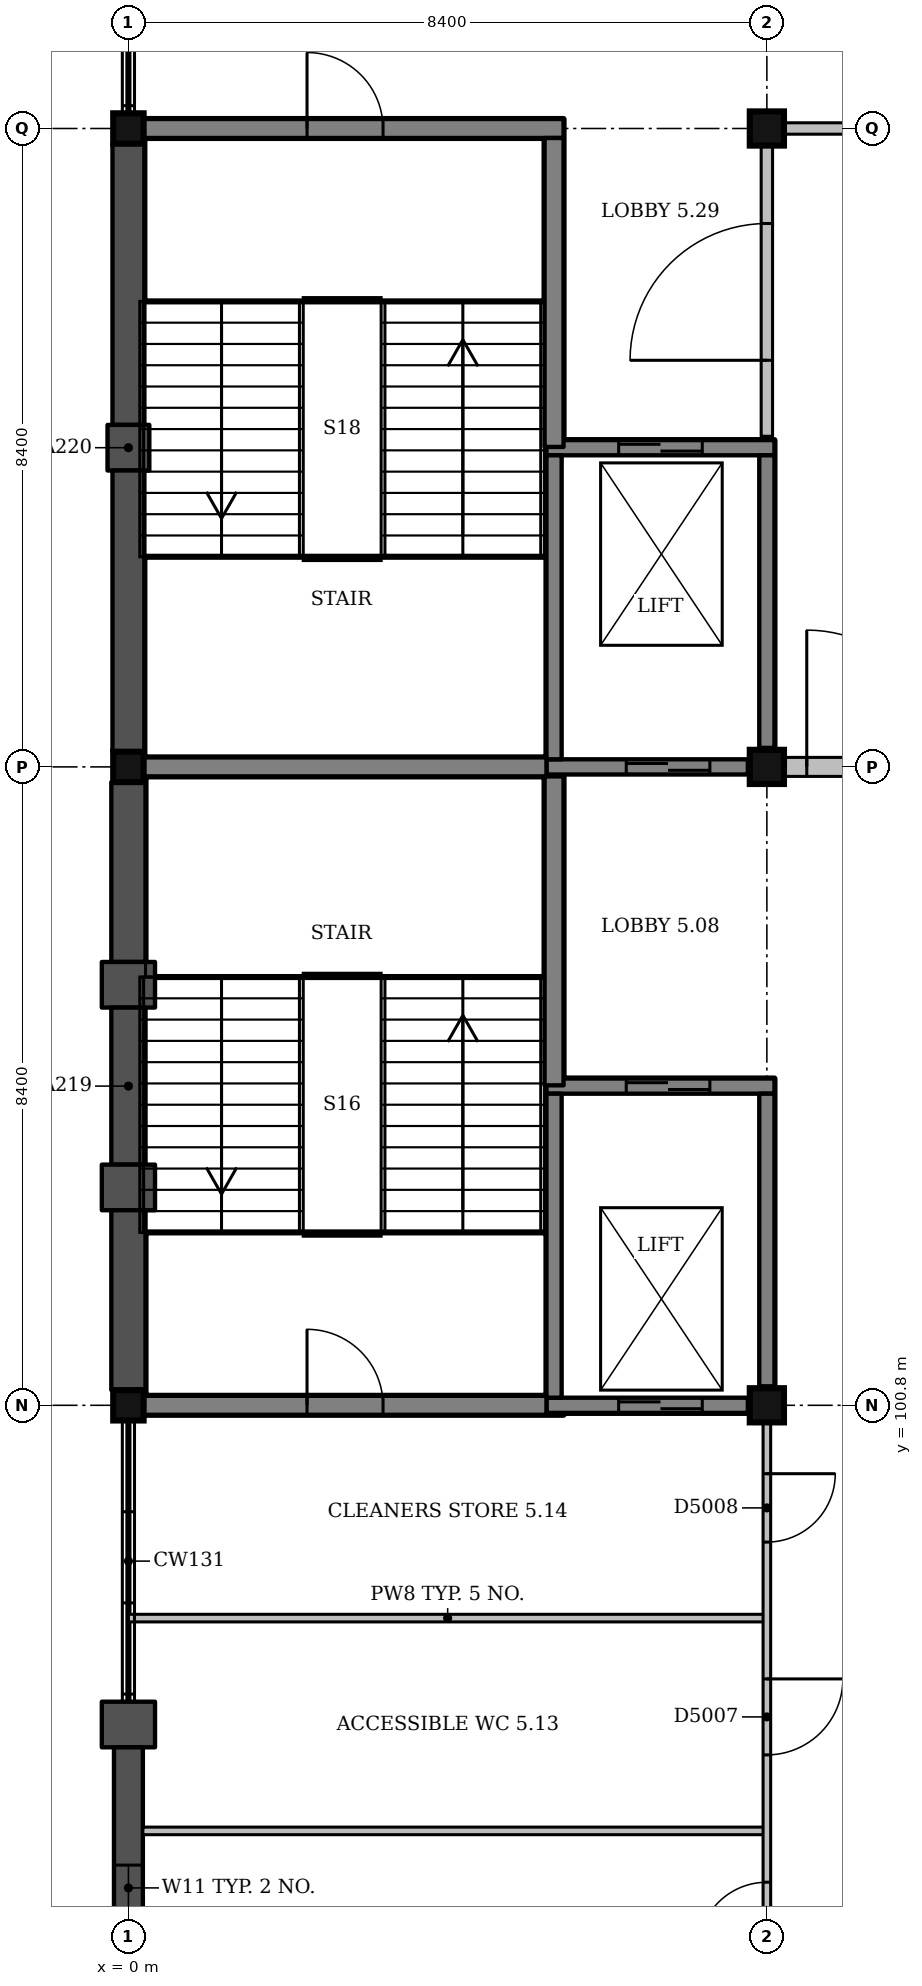
"""IFC4 building model, lengths in metres.
Left out: names, types, materials, properties, quantities, classifications, styles, units other than length and angle.
Written with IfcOpenShell. Run it as: python <this file> out.ifc"""

import sys

from ifc_helpers import new_model, si_unit, direction, frame, frame_2d, origin, origin_2d, place, context, subcontext, project, spatial, rectangle, extrude, element, fill, save


model = new_model("IFC4")
c1 = context("Model", 3, precision=1e-05, world=origin(), true_north=direction((0.0, 1.0)))
c2 = subcontext(c1, "Body", "Model", "MODEL_VIEW")
j1 = project(units=[si_unit("LENGTHUNIT", "METRE"), si_unit("PLANEANGLEUNIT", "RADIAN")], contexts=[c1])
p1 = place(None, origin())
s1 = spatial("IfcSite", under=j1, at=p1, CompositionType="ELEMENT")
p2 = place(p1, origin())
s2 = spatial("IfcBuilding", under=s1, at=p2, CompositionType="ELEMENT")
p3 = place(p2, frame((0.0, 0.0, 22.5)))
s3 = spatial("IfcBuildingStorey", under=s2, at=p3, CompositionType="ELEMENT", Elevation=22.5)
for number, where, z_axis, x_axis in (
    (1, (0.0, 100.8, 0.0), (0.0, 0.0, 1.0), (1.0, 0.0, 0.0)),
    (2, (0.0, 109.2, 0.0), (0.0, 0.0, 1.0), (1.0, 0.0, 0.0)),
):
    element("IfcColumn", number, at=place(p3, frame(where, z_axis=z_axis, x_axis=x_axis)), inside=s3, PredefinedType="COLUMN", context=c2, shape_type="SweptSolid", body=[
        extrude(rectangle(XDim=0.4, YDim=0.4, at=origin_2d()), origin(), (0.0, 0.0, 1.0), 4.5),
    ])
for number, where, z_axis, x_axis in (
    (3, (8.4, 100.8, 0.0), (0.0, 0.0, 1.0), (1.0, 0.0, 0.0)),
    (4, (8.4, 109.2, 0.0), (0.0, 0.0, 1.0), (1.0, 0.0, 0.0)),
):
    element("IfcColumn", number, at=place(p3, frame(where, z_axis=z_axis, x_axis=x_axis)), inside=s3, PredefinedType="COLUMN", context=c2, shape_type="SweptSolid", body=[
        extrude(rectangle(XDim=0.45, YDim=0.45, at=origin_2d()), origin(), (0.0, 0.0, 1.0), 4.5),
    ])
p4 = place(p3, frame((0.0, 117.6, 0.0), z_axis=(0.0, 0.0, 1.0), x_axis=(1.0, 0.0, 0.0)))
e5 = element("IfcColumn", 5, at=p4, inside=s3, PredefinedType="COLUMN", context=c2, shape_type="SweptSolid", body=[
    extrude(rectangle(XDim=0.4, YDim=0.4, at=origin_2d()), origin(), (0.0, 0.0, 1.0), 4.5),
])
p5 = place(p3, frame((8.4, 117.6, 0.0), z_axis=(0.0, 0.0, 1.0), x_axis=(1.0, 0.0, 0.0)))
e6 = element("IfcColumn", 6, at=p5, inside=s3, PredefinedType="COLUMN", context=c2, shape_type="SweptSolid", body=[
    extrude(rectangle(XDim=0.45, YDim=0.45, at=origin_2d()), origin(), (0.0, 0.0, 1.0), 4.5),
])
p6 = place(p3, frame((5.5, 100.8, 0.0), z_axis=(0.0, 0.0, 1.0), x_axis=(1.0, 0.0, 0.0)))
e7 = element("IfcWall", 7, at=p6, inside=s3, PredefinedType="SHEAR", context=c2, shape_type="SweptSolid", body=[
    extrude(rectangle(XDim=2.65, YDim=0.2, at=frame_2d((1.325, 0.0))), origin(), (0.0, 0.0, 1.0), 4.5),
])
p7 = place(p6, frame((0.95, 0.0, 0.0)))
e8 = element("IfcOpeningElement", 8, at=p7, cuts=e7, PredefinedType="OPENING", context=c2, shape_type="SweptSolid", body=[
    extrude(rectangle(XDim=1.1, YDim=2.1, at=frame_2d((0.55, 1.05))), frame((0.0, 0.11, 0.0), z_axis=(0.0, -1.0, 0.0), x_axis=(1.0, 0.0, 0.0)), (0.0, 0.0, 1.0), 0.22),
])
p8 = place(p3, frame((5.5, 105.0, 0.0), z_axis=(0.0, 0.0, 1.0), x_axis=(1.0, 0.0, 0.0)))
e9 = element("IfcWall", 9, at=p8, inside=s3, PredefinedType="SHEAR", context=c2, shape_type="SweptSolid", body=[
    extrude(rectangle(XDim=3.0, YDim=0.2, at=frame_2d((1.5, 0.0))), origin(), (0.0, 0.0, 1.0), 4.5),
])
p9 = place(p8, frame((1.05, 0.0, 0.0)))
e10 = element("IfcOpeningElement", 10, at=p9, cuts=e9, PredefinedType="OPENING", context=c2, shape_type="SweptSolid", body=[
    extrude(rectangle(XDim=1.1, YDim=2.1, at=frame_2d((0.55, 1.05))), frame((0.0, 0.11, 0.0), z_axis=(0.0, -1.0, 0.0), x_axis=(1.0, 0.0, 0.0)), (0.0, 0.0, 1.0), 0.22),
])
p10 = place(p3, frame((5.6, 100.9, 0.0), z_axis=(0.0, 0.0, 1.0), x_axis=(0.0, 1.0, 0.0)))
e11 = element("IfcWall", 11, at=p10, inside=s3, PredefinedType="SHEAR", context=c2, shape_type="SweptSolid", body=[
    extrude(rectangle(XDim=4.0, YDim=0.2, at=frame_2d((2.0, 0.0))), origin(), (0.0, 0.0, 1.0), 4.5),
])
p11 = place(p3, frame((8.4, 101.05, 0.0), z_axis=(0.0, 0.0, 1.0), x_axis=(0.0, 1.0, 0.0)))
e12 = element("IfcWall", 12, at=p11, inside=s3, PredefinedType="SHEAR", context=c2, shape_type="SweptSolid", body=[
    extrude(rectangle(XDim=3.85, YDim=0.2, at=frame_2d((1.925, 0.0))), origin(), (0.0, 0.0, 1.0), 4.5),
])
p12 = place(p3, frame((5.5, 109.2, 0.0), z_axis=(0.0, 0.0, 1.0), x_axis=(1.0, 0.0, 0.0)))
e13 = element("IfcWall", 13, at=p12, inside=s3, PredefinedType="SHEAR", context=c2, shape_type="SweptSolid", body=[
    extrude(rectangle(XDim=2.65, YDim=0.2, at=frame_2d((1.325, 0.0))), origin(), (0.0, 0.0, 1.0), 4.5),
])
p13 = place(p12, frame((1.05, 0.0, 0.0)))
e14 = element("IfcOpeningElement", 14, at=p13, cuts=e13, PredefinedType="OPENING", context=c2, shape_type="SweptSolid", body=[
    extrude(rectangle(XDim=1.1, YDim=2.1, at=frame_2d((0.55, 1.05))), frame((0.0, 0.11, 0.0), z_axis=(0.0, -1.0, 0.0), x_axis=(1.0, 0.0, 0.0)), (0.0, 0.0, 1.0), 0.22),
])
p14 = place(p3, frame((5.5, 113.4, 0.0), z_axis=(0.0, 0.0, 1.0), x_axis=(1.0, 0.0, 0.0)))
e15 = element("IfcWall", 15, at=p14, inside=s3, PredefinedType="SHEAR", context=c2, shape_type="SweptSolid", body=[
    extrude(rectangle(XDim=3.0, YDim=0.2, at=frame_2d((1.5, 0.0))), origin(), (0.0, 0.0, 1.0), 4.5),
])
p15 = place(p14, frame((0.95, 0.0, 0.0)))
e16 = element("IfcOpeningElement", 16, at=p15, cuts=e15, PredefinedType="OPENING", context=c2, shape_type="SweptSolid", body=[
    extrude(rectangle(XDim=1.1, YDim=2.1, at=frame_2d((0.55, 1.05))), frame((0.0, 0.11, 0.0), z_axis=(0.0, -1.0, 0.0), x_axis=(1.0, 0.0, 0.0)), (0.0, 0.0, 1.0), 0.22),
])
p16 = place(p3, frame((5.6, 109.3, 0.0), z_axis=(0.0, 0.0, 1.0), x_axis=(0.0, 1.0, 0.0)))
e17 = element("IfcWall", 17, at=p16, inside=s3, PredefinedType="SHEAR", context=c2, shape_type="SweptSolid", body=[
    extrude(rectangle(XDim=4.0, YDim=0.2, at=frame_2d((2.0, 0.0))), origin(), (0.0, 0.0, 1.0), 4.5),
])
p17 = place(p3, frame((8.4, 109.45, 0.0), z_axis=(0.0, 0.0, 1.0), x_axis=(0.0, 1.0, 0.0)))
e18 = element("IfcWall", 18, at=p17, inside=s3, PredefinedType="SHEAR", context=c2, shape_type="SweptSolid", body=[
    extrude(rectangle(XDim=3.85, YDim=0.2, at=frame_2d((1.925, 0.0))), origin(), (0.0, 0.0, 1.0), 4.5),
])
p18 = place(p3, frame((0.2, 100.8, 0.0), z_axis=(0.0, 0.0, 1.0), x_axis=(1.0, 0.0, 0.0)))
e19 = element("IfcWall", 19, at=p18, inside=s3, PredefinedType="SHEAR", context=c2, shape_type="SweptSolid", body=[
    extrude(rectangle(XDim=5.3, YDim=0.25, at=frame_2d((2.65, 0.0))), origin(), (0.0, 0.0, 1.0), 4.5),
])
p19 = place(p18, frame((2.15, 0.0, 0.0)))
e20 = element("IfcOpeningElement", 20, at=p19, cuts=e19, PredefinedType="OPENING", context=c2, shape_type="SweptSolid", body=[
    extrude(rectangle(XDim=1.0, YDim=2.1, at=frame_2d((0.5, 1.05))), frame((0.0, 0.135, 0.0), z_axis=(0.0, -1.0, 0.0), x_axis=(1.0, 0.0, 0.0)), (0.0, 0.0, 1.0), 0.27),
])
p20 = place(p3, frame((0.2, 109.2, 0.0), z_axis=(0.0, 0.0, 1.0), x_axis=(1.0, 0.0, 0.0)))
e21 = element("IfcWall", 21, at=p20, inside=s3, PredefinedType="SHEAR", context=c2, shape_type="SweptSolid", body=[
    extrude(rectangle(XDim=5.3, YDim=0.25, at=frame_2d((2.65, 0.0))), origin(), (0.0, 0.0, 1.0), 4.5),
])
p21 = place(p3, frame((5.6, 105.01, 0.0), z_axis=(0.0, 0.0, 1.0), x_axis=(0.0, 1.0, 0.0)))
e22 = element("IfcWall", 22, at=p21, inside=s3, PredefinedType="SHEAR", context=c2, shape_type="SweptSolid", body=[
    extrude(rectangle(XDim=4.065, YDim=0.25, at=frame_2d((2.032, 0.0))), origin(), (0.0, 0.0, 1.0), 4.5),
])
p22 = place(p3, frame((0.2, 117.6, 0.0), z_axis=(0.0, 0.0, 1.0), x_axis=(1.0, 0.0, 0.0)))
e23 = element("IfcWall", 23, at=p22, inside=s3, PredefinedType="SHEAR", context=c2, shape_type="SweptSolid", body=[
    extrude(rectangle(XDim=5.525, YDim=0.25, at=frame_2d((2.763, 0.0))), origin(), (0.0, 0.0, 1.0), 4.5),
])
p23 = place(p22, frame((2.15, 0.0, 0.0)))
e24 = element("IfcOpeningElement", 24, at=p23, cuts=e23, PredefinedType="OPENING", context=c2, shape_type="SweptSolid", body=[
    extrude(rectangle(XDim=1.0, YDim=2.1, at=frame_2d((0.5, 1.05))), frame((0.0, 0.135, 0.0), z_axis=(0.0, -1.0, 0.0), x_axis=(1.0, 0.0, 0.0)), (0.0, 0.0, 1.0), 0.27),
])
p24 = place(p3, frame((5.6, 113.41, 0.0), z_axis=(0.0, 0.0, 1.0), x_axis=(0.0, 1.0, 0.0)))
e25 = element("IfcWall", 25, at=p24, inside=s3, PredefinedType="SHEAR", context=c2, shape_type="SweptSolid", body=[
    extrude(rectangle(XDim=4.065, YDim=0.25, at=frame_2d((2.033, 0.0))), origin(), (0.0, 0.0, 1.0), 4.5),
])
p25 = place(p3, frame((0.0, 109.0, 0.0), z_axis=(0.0, 0.0, 1.0), x_axis=(0.0, -1.0, 0.0)))
e26 = element("IfcWall", 26, at=p25, inside=s3, PredefinedType="SOLIDWALL", context=c2, shape_type="SweptSolid", body=[
    extrude(rectangle(XDim=2.367, YDim=0.45, at=frame_2d((1.183, 0.0))), origin(), (0.0, 0.0, 1.0), 3.65),
])
p26 = place(p3, frame((0.0, 106.633, 0.0), z_axis=(0.0, 0.0, 1.0), x_axis=(0.0, -1.0, 0.0)))
e27 = element("IfcWall", 27, at=p26, inside=s3, PredefinedType="SOLIDWALL", context=c2, shape_type="SweptSolid", body=[
    extrude(rectangle(XDim=0.6, YDim=0.7, at=frame_2d((0.3, 0.0))), origin(), (0.0, 0.0, 1.0), 3.65),
])
p27 = place(p3, frame((0.0, 106.033, 0.0), z_axis=(0.0, 0.0, 1.0), x_axis=(0.0, -1.0, 0.0)))
e28 = element("IfcWall", 28, at=p27, inside=s3, PredefinedType="SOLIDWALL", context=c2, shape_type="SweptSolid", body=[
    extrude(rectangle(XDim=2.066, YDim=0.45, at=frame_2d((1.033, 0.0))), origin(), (0.0, 0.0, 1.0), 3.65),
])
p28 = place(p3, frame((0.0, 103.967, 0.0), z_axis=(0.0, 0.0, 1.0), x_axis=(0.0, -1.0, 0.0)))
e29 = element("IfcWall", 29, at=p28, inside=s3, PredefinedType="SOLIDWALL", context=c2, shape_type="SweptSolid", body=[
    extrude(rectangle(XDim=0.6, YDim=0.7, at=frame_2d((0.3, 0.0))), origin(), (0.0, 0.0, 1.0), 3.65),
])
p29 = place(p3, frame((0.0, 103.367, 0.0), z_axis=(0.0, 0.0, 1.0), x_axis=(0.0, -1.0, 0.0)))
e30 = element("IfcWall", 30, at=p29, inside=s3, PredefinedType="SOLIDWALL", context=c2, shape_type="SweptSolid", body=[
    extrude(rectangle(XDim=2.367, YDim=0.45, at=frame_2d((1.183, 0.0))), origin(), (0.0, 0.0, 1.0), 3.65),
])
p30 = place(p3, frame((0.0, 96.9, 0.0), z_axis=(0.0, 0.0, 1.0), x_axis=(0.0, -1.0, 0.0)))
e31 = element("IfcWall", 31, at=p30, inside=s3, PredefinedType="SOLIDWALL", context=c2, shape_type="SweptSolid", body=[
    extrude(rectangle(XDim=0.6, YDim=0.7, at=frame_2d((0.3, 0.0))), origin(), (0.0, 0.0, 1.0), 3.35),
])
p31 = place(p3, frame((0.0, 96.3, 0.0), z_axis=(0.0, 0.0, 1.0), x_axis=(0.0, -1.0, 0.0)))
e32 = element("IfcWall", 32, at=p31, inside=s3, PredefinedType="SOLIDWALL", context=c2, shape_type="SweptSolid", body=[
    extrude(rectangle(XDim=3.7, YDim=0.38, at=frame_2d((1.85, 0.0))), origin(), (0.0, 0.0, 1.0), 3.35),
])
p32 = place(p31, frame((1.55, 0.0, 1.5)))
e33 = element("IfcOpeningElement", 33, at=p32, cuts=e32, PredefinedType="OPENING", context=c2, shape_type="SweptSolid", body=[
    extrude(rectangle(XDim=0.6, YDim=1.2, at=frame_2d((0.3, 0.6))), frame((0.0, 0.2, 0.0), z_axis=(0.0, -1.0, 0.0), x_axis=(1.0, 0.0, 0.0)), (0.0, 0.0, 1.0), 0.4),
])
p33 = place(p3, frame((0.0, 117.4, 0.0), z_axis=(0.0, 0.0, 1.0), x_axis=(0.0, -1.0, 0.0)))
e34 = element("IfcWall", 34, at=p33, inside=s3, PredefinedType="SOLIDWALL", context=c2, shape_type="SweptSolid", body=[
    extrude(rectangle(XDim=3.7, YDim=0.42, at=frame_2d((1.85, 0.0))), origin(), (0.0, 0.0, 1.0), 4.5),
])
p34 = place(p3, frame((0.0, 113.7, 0.0), z_axis=(0.0, 0.0, 1.0), x_axis=(0.0, -1.0, 0.0)))
e35 = element("IfcWall", 35, at=p34, inside=s3, PredefinedType="SOLIDWALL", context=c2, shape_type="SweptSolid", body=[
    extrude(rectangle(XDim=0.6, YDim=0.55, at=frame_2d((0.3, 0.0))), origin(), (0.0, 0.0, 1.0), 4.5),
])
p35 = place(p3, frame((0.0, 113.1, 0.0), z_axis=(0.0, 0.0, 1.0), x_axis=(0.0, -1.0, 0.0)))
e36 = element("IfcWall", 36, at=p35, inside=s3, PredefinedType="SOLIDWALL", context=c2, shape_type="SweptSolid", body=[
    extrude(rectangle(XDim=3.7, YDim=0.42, at=frame_2d((1.85, 0.0))), origin(), (0.0, 0.0, 1.0), 4.5),
])
p36 = place(p3, frame((0.19, 95.2, 0.0), z_axis=(0.0, 0.0, 1.0), x_axis=(1.0, 0.0, 0.0)))
e37 = element("IfcWall", 37, at=p36, inside=s3, PredefinedType="PARTITIONING", context=c2, shape_type="SweptSolid", body=[
    extrude(rectangle(XDim=8.21, YDim=0.1, at=frame_2d((4.105, 0.0))), origin(), (0.0, 0.0, 1.0), 3.35),
])
p37 = place(p3, frame((0.0, 98.0, 0.0), z_axis=(0.0, 0.0, 1.0), x_axis=(1.0, 0.0, 0.0)))
e38 = element("IfcWall", 38, at=p37, inside=s3, PredefinedType="PARTITIONING", context=c2, shape_type="SweptSolid", body=[
    extrude(rectangle(XDim=8.4, YDim=0.1, at=frame_2d((4.2, 0.0))), origin(), (0.0, 0.0, 1.0), 3.27),
])
p38 = place(p3, frame((8.625, 109.2, 0.0), z_axis=(0.0, 0.0, 1.0), x_axis=(1.0, 0.0, 0.0)))
e39 = element("IfcWall", 39, at=p38, inside=s3, PredefinedType="SOLIDWALL", context=c2, shape_type="SweptSolid", body=[
    extrude(rectangle(XDim=7.95, YDim=0.25, at=frame_2d((3.975, 0.0))), origin(), (0.0, 0.0, 1.0), 3.4),
])
p39 = place(p38, frame((0.3, 0.0, 0.0)))
e40 = element("IfcOpeningElement", 40, at=p39, cuts=e39, PredefinedType="OPENING", context=c2, shape_type="SweptSolid", body=[
    extrude(rectangle(XDim=1.8, YDim=2.1, at=frame_2d((0.9, 1.05))), frame((0.0, 0.135, 0.0), z_axis=(0.0, -1.0, 0.0), x_axis=(1.0, 0.0, 0.0)), (0.0, 0.0, 1.0), 0.27),
])
p40 = place(p3, frame((8.625, 117.6, 0.0), z_axis=(0.0, 0.0, 1.0), x_axis=(1.0, 0.0, 0.0)))
e41 = element("IfcWall", 41, at=p40, inside=s3, PredefinedType="PARTITIONING", context=c2, shape_type="SweptSolid", body=[
    extrude(rectangle(XDim=7.95, YDim=0.15, at=frame_2d((3.975, 0.0))), origin(), (0.0, 0.0, 1.0), 3.4),
])
p41 = place(p3, frame((8.4, 113.55, 0.0), z_axis=(0.0, 0.0, 1.0), x_axis=(0.0, 1.0, 0.0)))
e42 = element("IfcWall", 42, at=p41, inside=s3, PredefinedType="PARTITIONING", context=c2, shape_type="SweptSolid", body=[
    extrude(rectangle(XDim=3.825, YDim=0.15, at=frame_2d((1.913, 0.0))), origin(), (0.0, 0.0, 1.0), 3.4),
])
p42 = place(p41, frame((1.0, 0.0, 0.0)))
e43 = element("IfcOpeningElement", 43, at=p42, cuts=e42, PredefinedType="OPENING", context=c2, shape_type="SweptSolid", body=[
    extrude(rectangle(XDim=1.8, YDim=2.1, at=frame_2d((0.9, 1.05))), frame((0.0, 0.085, 0.0), z_axis=(0.0, -1.0, 0.0), x_axis=(1.0, 0.0, 0.0)), (0.0, 0.0, 1.0), 0.17),
])
p43 = place(p3, frame((8.4, 92.625, 0.0), z_axis=(0.0, 0.0, 1.0), x_axis=(0.0, 1.0, 0.0)))
e44 = element("IfcWall", 44, at=p43, inside=s3, PredefinedType="PARTITIONING", context=c2, shape_type="SweptSolid", body=[
    extrude(rectangle(XDim=7.95, YDim=0.1, at=frame_2d((3.975, 0.0))), origin(), (0.0, 0.0, 1.0), 3.4),
])
p44 = place(p43, frame((1.0, 0.0, 0.0)))
e45 = element("IfcOpeningElement", 45, at=p44, cuts=e44, PredefinedType="OPENING", context=c2, shape_type="SweptSolid", body=[
    extrude(rectangle(XDim=0.9, YDim=2.1, at=frame_2d((0.45, 1.05))), frame((0.0, 0.06, 0.0), z_axis=(0.0, -1.0, 0.0), x_axis=(1.0, 0.0, 0.0)), (0.0, 0.0, 1.0), 0.12),
])
p45 = place(p43, frame((3.575, 0.0, 0.0)))
e46 = element("IfcOpeningElement", 46, at=p45, cuts=e44, PredefinedType="OPENING", context=c2, shape_type="SweptSolid", body=[
    extrude(rectangle(XDim=1.0, YDim=2.1, at=frame_2d((0.5, 1.05))), frame((0.0, 0.06, 0.0), z_axis=(0.0, -1.0, 0.0), x_axis=(1.0, 0.0, 0.0)), (0.0, 0.0, 1.0), 0.12),
])
p46 = place(p43, frame((6.375, 0.0, 0.0)))
e47 = element("IfcOpeningElement", 47, at=p46, cuts=e44, PredefinedType="OPENING", context=c2, shape_type="SweptSolid", body=[
    extrude(rectangle(XDim=0.9, YDim=2.1, at=frame_2d((0.45, 1.05))), frame((0.0, 0.06, 0.0), z_axis=(0.0, -1.0, 0.0), x_axis=(1.0, 0.0, 0.0)), (0.0, 0.0, 1.0), 0.12),
])
p47 = place(p32, origin())
e48 = element("IfcWindow", 48, at=p47, inside=s3, PartitioningType="SINGLE_PANEL", PredefinedType="WINDOW", context=c2, shape_type="SweptSolid", body=[
    extrude(rectangle(XDim=0.6, YDim=1.2, at=frame_2d((0.3, 0.6))), frame((0.0, 0.15, 0.0), z_axis=(0.0, -1.0, 0.0), x_axis=(1.0, 0.0, 0.0)), (0.0, 0.0, 1.0), 0.06),
])
fill(e33, e48)
p48 = place(p44, origin())
e49 = element("IfcDoor", 49, at=p48, inside=s3, OperationType="SINGLE_SWING_LEFT", PredefinedType="DOOR", context=c2, shape_type="SweptSolid", body=[
    extrude(rectangle(XDim=0.9, YDim=2.1, at=frame_2d((0.45, 1.05))), frame((0.0, 0.025, 0.0), z_axis=(0.0, -1.0, 0.0), x_axis=(1.0, 0.0, 0.0)), (0.0, 0.0, 1.0), 0.05),
])
fill(e45, e49)
p49 = place(p45, origin())
e50 = element("IfcDoor", 50, at=p49, inside=s3, OperationType="SINGLE_SWING_RIGHT", PredefinedType="DOOR", context=c2, shape_type="SweptSolid", body=[
    extrude(rectangle(XDim=1.0, YDim=2.1, at=frame_2d((0.5, 1.05))), frame((0.0, 0.025, 0.0), z_axis=(0.0, -1.0, 0.0), x_axis=(1.0, 0.0, 0.0)), (0.0, 0.0, 1.0), 0.05),
])
fill(e46, e50)
p50 = place(p46, origin())
e51 = element("IfcDoor", 51, at=p50, inside=s3, OperationType="SINGLE_SWING_RIGHT", PredefinedType="DOOR", context=c2, shape_type="SweptSolid", body=[
    extrude(rectangle(XDim=0.9, YDim=2.1, at=frame_2d((0.45, 1.05))), frame((0.0, 0.025, 0.0), z_axis=(0.0, -1.0, 0.0), x_axis=(1.0, 0.0, 0.0)), (0.0, 0.0, 1.0), 0.05),
])
fill(e47, e51)
p51 = place(p42, origin())
e52 = element("IfcDoor", 52, at=p51, inside=s3, OperationType="DOUBLE_DOOR_SINGLE_SWING", PredefinedType="DOOR", context=c2, shape_type="SweptSolid", body=[
    extrude(rectangle(XDim=1.8, YDim=2.1, at=frame_2d((0.9, 1.05))), frame((0.0, 0.025, 0.0), z_axis=(0.0, -1.0, 0.0), x_axis=(1.0, 0.0, 0.0)), (0.0, 0.0, 1.0), 0.05),
])
fill(e43, e52)
p52 = place(p39, origin())
e53 = element("IfcDoor", 53, at=p52, inside=s3, OperationType="DOUBLE_DOOR_SINGLE_SWING", PredefinedType="DOOR", context=c2, shape_type="SweptSolid", body=[
    extrude(rectangle(XDim=1.8, YDim=2.1, at=frame_2d((0.9, 1.05))), frame((0.0, 0.025, 0.0), z_axis=(0.0, -1.0, 0.0), x_axis=(1.0, 0.0, 0.0)), (0.0, 0.0, 1.0), 0.05),
])
fill(e40, e53)
p53 = place(p19, origin())
e54 = element("IfcDoor", 54, at=p53, inside=s3, OperationType="SINGLE_SWING_LEFT", PredefinedType="DOOR", context=c2, shape_type="SweptSolid", body=[
    extrude(rectangle(XDim=1.0, YDim=2.1, at=frame_2d((0.5, 1.05))), frame((0.0, 0.025, 0.0), z_axis=(0.0, -1.0, 0.0), x_axis=(1.0, 0.0, 0.0)), (0.0, 0.0, 1.0), 0.05),
])
fill(e20, e54)
p54 = place(p23, origin())
e55 = element("IfcDoor", 55, at=p54, inside=s3, OperationType="SINGLE_SWING_LEFT", PredefinedType="DOOR", context=c2, shape_type="SweptSolid", body=[
    extrude(rectangle(XDim=1.0, YDim=2.1, at=frame_2d((0.5, 1.05))), frame((0.0, 0.025, 0.0), z_axis=(0.0, -1.0, 0.0), x_axis=(1.0, 0.0, 0.0)), (0.0, 0.0, 1.0), 0.05),
])
fill(e24, e55)
p55 = place(p7, origin())
e56 = element("IfcDoor", 56, at=p55, inside=s3, OperationType="SLIDING_TO_LEFT", PredefinedType="DOOR", context=c2, shape_type="SweptSolid", body=[
    extrude(rectangle(XDim=1.1, YDim=2.1, at=frame_2d((0.55, 1.05))), frame((0.0, 0.025, 0.0), z_axis=(0.0, -1.0, 0.0), x_axis=(1.0, 0.0, 0.0)), (0.0, 0.0, 1.0), 0.05),
])
fill(e8, e56)
p56 = place(p9, origin())
e57 = element("IfcDoor", 57, at=p56, inside=s3, OperationType="SLIDING_TO_RIGHT", PredefinedType="DOOR", context=c2, shape_type="SweptSolid", body=[
    extrude(rectangle(XDim=1.1, YDim=2.1, at=frame_2d((0.55, 1.05))), frame((0.0, 0.025, 0.0), z_axis=(0.0, -1.0, 0.0), x_axis=(1.0, 0.0, 0.0)), (0.0, 0.0, 1.0), 0.05),
])
fill(e10, e57)
p57 = place(p13, origin())
e58 = element("IfcDoor", 58, at=p57, inside=s3, OperationType="SLIDING_TO_LEFT", PredefinedType="DOOR", context=c2, shape_type="SweptSolid", body=[
    extrude(rectangle(XDim=1.1, YDim=2.1, at=frame_2d((0.55, 1.05))), frame((0.0, 0.025, 0.0), z_axis=(0.0, -1.0, 0.0), x_axis=(1.0, 0.0, 0.0)), (0.0, 0.0, 1.0), 0.05),
])
fill(e14, e58)
p58 = place(p15, origin())
e59 = element("IfcDoor", 59, at=p58, inside=s3, OperationType="SLIDING_TO_RIGHT", PredefinedType="DOOR", context=c2, shape_type="SweptSolid", body=[
    extrude(rectangle(XDim=1.1, YDim=2.1, at=frame_2d((0.55, 1.05))), frame((0.0, 0.025, 0.0), z_axis=(0.0, -1.0, 0.0), x_axis=(1.0, 0.0, 0.0)), (0.0, 0.0, 1.0), 0.05),
])
fill(e16, e59)
save(model, sys.argv[1])
